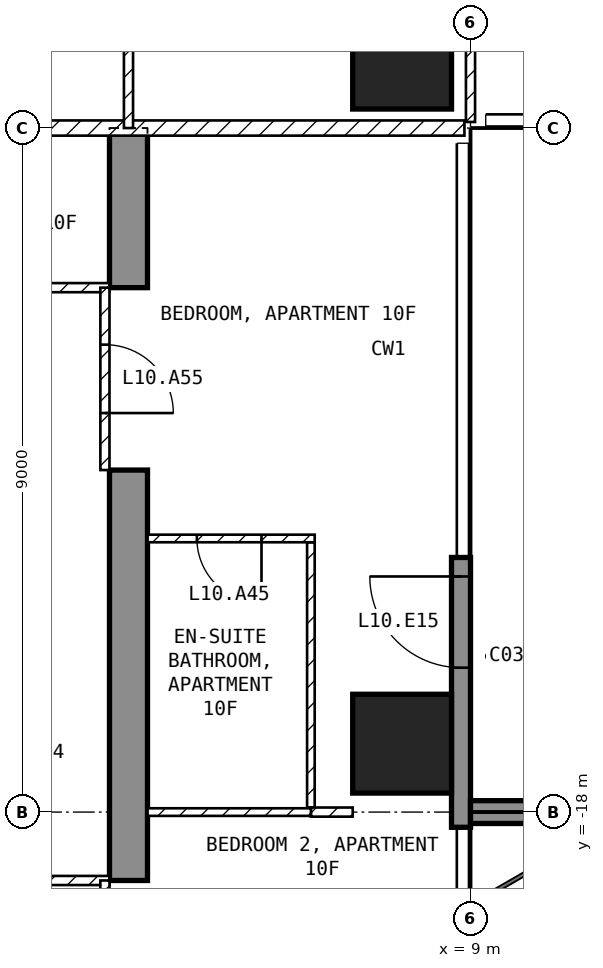
"""IFC4 building model, lengths in metres.
Left out: names, types, materials, properties, quantities, classifications, styles, units other than length and angle.
Written with IfcOpenShell. Run it as: python <this file> out.ifc"""

import sys

from ifc_helpers import new_model, si_unit, direction, frame, frame_2d, origin, origin_2d, place, context, subcontext, project, spatial, polyline, rectangle, outline, extrude, element, fill, save


model = new_model("IFC4")
c1 = context("Model", 3, precision=1e-05, world=origin(), true_north=direction((0.0, 1.0)))
c2 = subcontext(c1, "Body", "Model", "MODEL_VIEW")
j1 = project(units=[si_unit("LENGTHUNIT", "METRE"), si_unit("PLANEANGLEUNIT", "RADIAN")], contexts=[c1])
p1 = place(None, origin())
s1 = spatial("IfcSite", under=j1, at=p1, CompositionType="ELEMENT")
p2 = place(p1, origin())
s2 = spatial("IfcBuilding", under=s1, at=p2, CompositionType="ELEMENT")
p3 = place(p2, frame((0.0, 0.0, 54.0)))
s3 = spatial("IfcBuildingStorey", under=s2, at=p3, CompositionType="ELEMENT", Elevation=54.0)
for number, where, z_axis, x_axis in (
    (1, (8.1, -17.1, -0.25), (0.0, 0.0, 1.0), (1.0, 0.0, 0.0)),
    (2, (8.1, -8.1, -0.25), (0.0, 0.0, 1.0), (1.0, 0.0, 0.0)),
):
    element("IfcColumn", number, at=place(p3, frame(where, z_axis=z_axis, x_axis=x_axis)), inside=s3, PredefinedType="COLUMN", context=c2, shape_type="SweptSolid", body=[
        extrude(rectangle(XDim=1.3, YDim=1.3, at=origin_2d()), origin(), (0.0, 0.0, 1.0), 3.5),
    ])
p4 = place(p3, frame((4.25, -25.45, -0.25), z_axis=(1.0, 0.0, 0.0), x_axis=(0.0, 1.0, 0.0)))
e3 = element("IfcWall", 3, at=p4, inside=s3, PredefinedType="SHEAR", context=c2, shape_type="SweptSolid", body=[
    extrude(outline(polyline([(0.0, 0.0), (4.15, 0.0), (4.15, 2.65), (6.55, 2.65), (6.55, 0.0), (11.95, 0.0), (11.95, 2.65), (14.35, 2.65), (14.35, 0.0), (16.45, 0.0), (16.45, 3.5), (0.0, 3.5), (0.0, 0.0)])), origin(), (0.0, 0.0, 1.0), 0.5),
])
p5 = place(p3, frame((8.875, -18.2, 0.0), z_axis=(0.0, 0.0, 1.0), x_axis=(0.0, 1.0, 0.0)))
e4 = element("IfcWall", 4, at=p5, inside=s3, PredefinedType="SOLIDWALL", context=c2, shape_type="SweptSolid", body=[
    extrude(rectangle(XDim=3.55, YDim=0.25, at=frame_2d((1.775, 0.0))), origin(), (0.0, 0.0, 1.0), 3.25),
])
p6 = place(p5, frame((2.1, 0.0, 0.0)))
e5 = element("IfcOpeningElement", 5, at=p6, cuts=e4, PredefinedType="OPENING", context=c2, shape_type="SweptSolid", body=[
    extrude(rectangle(XDim=1.2, YDim=2.4, at=frame_2d((0.6, 1.2))), frame((0.0, 0.135, 0.0), z_axis=(0.0, -1.0, 0.0), x_axis=(1.0, 0.0, 0.0)), (0.0, 0.0, 1.0), 0.27),
])
p7 = place(p3, frame((9.0, -18.0, 0.0), z_axis=(0.0, 0.0, 1.0), x_axis=(1.0, 0.0, 0.0)))
e6 = element("IfcWall", 6, at=p7, inside=s3, PredefinedType="SOLIDWALL", context=c2, shape_type="SweptSolid", body=[
    extrude(rectangle(XDim=2.7, YDim=0.3, at=frame_2d((1.35, 0.0))), origin(), (0.0, 0.0, 1.0), 3.25),
])
p8 = place(p3, frame((8.92, -9.0, 0.0), z_axis=(0.0, 0.0, 1.0), x_axis=(-1.0, 0.0, 0.0)))
e7 = element("IfcWall", 7, at=p8, inside=s3, PredefinedType="PARTITIONING", context=c2, shape_type="SweptSolid", body=[
    extrude(rectangle(XDim=17.84, YDim=0.2, at=frame_2d((8.92, 0.0))), origin(), (0.0, 0.0, 1.0), 3.25),
])
p9 = place(p8, frame((8.42, 0.0, 0.0)))
e8 = element("IfcOpeningElement", 8, at=p9, cuts=e7, PredefinedType="OPENING", context=c2, shape_type="SweptSolid", body=[
    extrude(rectangle(XDim=1.0, YDim=2.1, at=frame_2d((0.5, 1.05))), frame((0.0, 0.11, 0.0), z_axis=(0.0, -1.0, 0.0), x_axis=(1.0, 0.0, 0.0)), (0.0, 0.0, 1.0), 0.22),
])
p10 = place(p3, frame((9.0, -8.92, 0.0), z_axis=(0.0, 0.0, 1.0), x_axis=(0.0, 1.0, 0.0)))
e9 = element("IfcWall", 9, at=p10, inside=s3, PredefinedType="PARTITIONING", context=c2, shape_type="SweptSolid", body=[
    extrude(rectangle(XDim=7.62, YDim=0.12, at=frame_2d((3.81, 0.0))), origin(), (0.0, 0.0, 1.0), 3.25),
])
p11 = place(p10, frame((2.67, 0.0, 0.0)))
e10 = element("IfcOpeningElement", 10, at=p11, cuts=e9, PredefinedType="OPENING", context=c2, shape_type="SweptSolid", body=[
    extrude(rectangle(XDim=0.9, YDim=2.1, at=frame_2d((0.45, 1.05))), frame((0.0, 0.07, 0.0), z_axis=(0.0, -1.0, 0.0), x_axis=(1.0, 0.0, 0.0)), (0.0, 0.0, 1.0), 0.14),
])
p12 = place(p3, frame((4.5, -9.0, 0.0), z_axis=(0.0, 0.0, 1.0), x_axis=(0.0, 1.0, 0.0)))
e11 = element("IfcWall", 11, at=p12, inside=s3, PredefinedType="PARTITIONING", context=c2, shape_type="SweptSolid", body=[
    extrude(rectangle(XDim=3.9, YDim=0.12, at=frame_2d((1.95, 0.0))), origin(), (0.0, 0.0, 1.0), 3.25),
])
p13 = place(p12, frame((1.5, 0.0, 0.0)))
e12 = element("IfcOpeningElement", 12, at=p13, cuts=e11, PredefinedType="OPENING", context=c2, shape_type="SweptSolid", body=[
    extrude(rectangle(XDim=0.9, YDim=2.1, at=frame_2d((0.45, 1.05))), frame((0.0, 0.07, 0.0), z_axis=(0.0, -1.0, 0.0), x_axis=(1.0, 0.0, 0.0)), (0.0, 0.0, 1.0), 0.14),
])
p14 = place(p3, frame((4.25, -11.1, 0.0), z_axis=(0.0, 0.0, 1.0), x_axis=(-1.0, 0.0, 0.0)))
e13 = element("IfcWall", 13, at=p14, inside=s3, PredefinedType="PARTITIONING", context=c2, shape_type="SweptSolid", body=[
    extrude(rectangle(XDim=6.35, YDim=0.12, at=frame_2d((3.175, 0.0))), origin(), (0.0, 0.0, 1.0), 3.25),
])
p15 = place(p14, frame((2.725, 0.0, 0.0)))
e14 = element("IfcOpeningElement", 14, at=p15, cuts=e13, PredefinedType="OPENING", context=c2, shape_type="SweptSolid", body=[
    extrude(rectangle(XDim=0.9, YDim=2.1, at=frame_2d((0.45, 1.05))), frame((0.0, 0.07, 0.0), z_axis=(0.0, -1.0, 0.0), x_axis=(1.0, 0.0, 0.0)), (0.0, 0.0, 1.0), 0.14),
])
p16 = place(p3, frame((4.25, -18.9, 0.0), z_axis=(0.0, 0.0, 1.0), x_axis=(-1.0, 0.0, 0.0)))
e15 = element("IfcWall", 15, at=p16, inside=s3, PredefinedType="PARTITIONING", context=c2, shape_type="SweptSolid", body=[
    extrude(rectangle(XDim=8.5, YDim=0.12, at=frame_2d((4.25, 0.0))), origin(), (0.0, 0.0, 1.0), 3.25),
])
p17 = place(p16, frame((5.675, 0.0, 0.0)))
e16 = element("IfcOpeningElement", 16, at=p17, cuts=e15, PredefinedType="OPENING", context=c2, shape_type="SweptSolid", body=[
    extrude(rectangle(XDim=0.9, YDim=2.1, at=frame_2d((0.45, 1.05))), frame((0.0, 0.07, 0.0), z_axis=(0.0, -1.0, 0.0), x_axis=(1.0, 0.0, 0.0)), (0.0, 0.0, 1.0), 0.14),
])
p18 = place(p3, frame((6.9, -17.94, 0.0), z_axis=(0.0, 0.0, 1.0), x_axis=(0.0, 1.0, 0.0)))
e17 = element("IfcWall", 17, at=p18, inside=s3, PredefinedType="PARTITIONING", context=c2, shape_type="SweptSolid", body=[
    extrude(rectangle(XDim=3.49, YDim=0.1, at=frame_2d((1.745, 0.0))), origin(), (0.0, 0.0, 1.0), 3.25),
])
p19 = place(p3, frame((6.95, -14.4, 0.0), z_axis=(0.0, 0.0, 1.0), x_axis=(-1.0, 0.0, 0.0)))
e18 = element("IfcWall", 18, at=p19, inside=s3, PredefinedType="PARTITIONING", context=c2, shape_type="SweptSolid", body=[
    extrude(rectangle(XDim=2.2, YDim=0.1, at=frame_2d((1.1, 0.0))), origin(), (0.0, 0.0, 1.0), 3.25),
])
p20 = place(p19, frame((0.7, 0.0, 0.0)))
e19 = element("IfcOpeningElement", 19, at=p20, cuts=e18, PredefinedType="OPENING", context=c2, shape_type="SweptSolid", body=[
    extrude(rectangle(XDim=0.85, YDim=2.1, at=frame_2d((0.425, 1.05))), frame((0.0, 0.06, 0.0), z_axis=(0.0, -1.0, 0.0), x_axis=(1.0, 0.0, 0.0)), (0.0, 0.0, 1.0), 0.12),
])
p21 = place(p3, frame((7.45, -18.0, 0.0), z_axis=(0.0, 0.0, 1.0), x_axis=(-1.0, 0.0, 0.0)))
e20 = element("IfcWall", 20, at=p21, inside=s3, PredefinedType="PARTITIONING", context=c2, shape_type="SweptSolid", body=[
    extrude(rectangle(XDim=0.55, YDim=0.12, at=frame_2d((0.275, 0.0))), origin(), (0.0, 0.0, 1.0), 3.25),
])
p22 = place(p3, frame((6.9, -18.0, 0.0), z_axis=(0.0, 0.0, 1.0), x_axis=(-1.0, 0.0, 0.0)))
e21 = element("IfcWall", 21, at=p22, inside=s3, PredefinedType="PARTITIONING", context=c2, shape_type="SweptSolid", body=[
    extrude(rectangle(XDim=2.15, YDim=0.1, at=frame_2d((1.075, 0.0))), origin(), (0.0, 0.0, 1.0), 3.25),
])
p23 = place(p3, frame((4.19, -11.1, 0.0), z_axis=(0.0, 0.0, 1.0), x_axis=(0.0, -1.0, 0.0)))
e22 = element("IfcWall", 22, at=p23, inside=s3, PredefinedType="PARTITIONING", context=c2, shape_type="SweptSolid", body=[
    extrude(rectangle(XDim=2.4, YDim=0.12, at=frame_2d((1.2, 0.0))), origin(), (0.0, 0.0, 1.0), 2.4),
])
p24 = place(p23, frame((0.75, 0.0, 0.0)))
e23 = element("IfcOpeningElement", 23, at=p24, cuts=e22, PredefinedType="OPENING", context=c2, shape_type="SweptSolid", body=[
    extrude(rectangle(XDim=0.9, YDim=2.1, at=frame_2d((0.45, 1.05))), frame((0.0, 0.07, 0.0), z_axis=(0.0, -1.0, 0.0), x_axis=(1.0, 0.0, 0.0)), (0.0, 0.0, 1.0), 0.14),
])
p25 = place(p3, frame((4.19, -18.9, 0.0), z_axis=(0.0, 0.0, 1.0), x_axis=(0.0, -1.0, 0.0)))
e24 = element("IfcWall", 24, at=p25, inside=s3, PredefinedType="PARTITIONING", context=c2, shape_type="SweptSolid", body=[
    extrude(rectangle(XDim=2.4, YDim=0.12, at=frame_2d((1.2, 0.0))), origin(), (0.0, 0.0, 1.0), 2.4),
])
p26 = place(p25, frame((0.55, 0.0, 0.0)))
e25 = element("IfcOpeningElement", 25, at=p26, cuts=e24, PredefinedType="OPENING", context=c2, shape_type="SweptSolid", body=[
    extrude(rectangle(XDim=0.9, YDim=2.1, at=frame_2d((0.45, 1.05))), frame((0.0, 0.07, 0.0), z_axis=(0.0, -1.0, 0.0), x_axis=(1.0, 0.0, 0.0)), (0.0, 0.0, 1.0), 0.14),
])
p27 = place(p6, origin())
e26 = element("IfcDoor", 26, at=p27, inside=s3, OperationType="SINGLE_SWING_RIGHT", PredefinedType="DOOR", context=c2, shape_type="SweptSolid", body=[
    extrude(rectangle(XDim=1.2, YDim=2.4, at=frame_2d((0.6, 1.2))), frame((0.0, 0.025, 0.0), z_axis=(0.0, -1.0, 0.0), x_axis=(1.0, 0.0, 0.0)), (0.0, 0.0, 1.0), 0.05),
])
fill(e5, e26)
p28 = place(p20, origin())
e27 = element("IfcDoor", 27, at=p28, inside=s3, OperationType="SINGLE_SWING_LEFT", PredefinedType="DOOR", context=c2, shape_type="SweptSolid", body=[
    extrude(rectangle(XDim=0.85, YDim=2.1, at=frame_2d((0.425, 1.05))), frame((0.0, 0.025, 0.0), z_axis=(0.0, -1.0, 0.0), x_axis=(1.0, 0.0, 0.0)), (0.0, 0.0, 1.0), 0.05),
])
fill(e19, e27)
p29 = place(p24, origin())
e28 = element("IfcDoor", 28, at=p29, inside=s3, OperationType="SINGLE_SWING_RIGHT", PredefinedType="DOOR", context=c2, shape_type="SweptSolid", body=[
    extrude(rectangle(XDim=0.9, YDim=2.1, at=frame_2d((0.45, 1.05))), frame((0.0, 0.025, 0.0), z_axis=(0.0, -1.0, 0.0), x_axis=(1.0, 0.0, 0.0)), (0.0, 0.0, 1.0), 0.05),
])
fill(e23, e28)
save(model, sys.argv[1])
